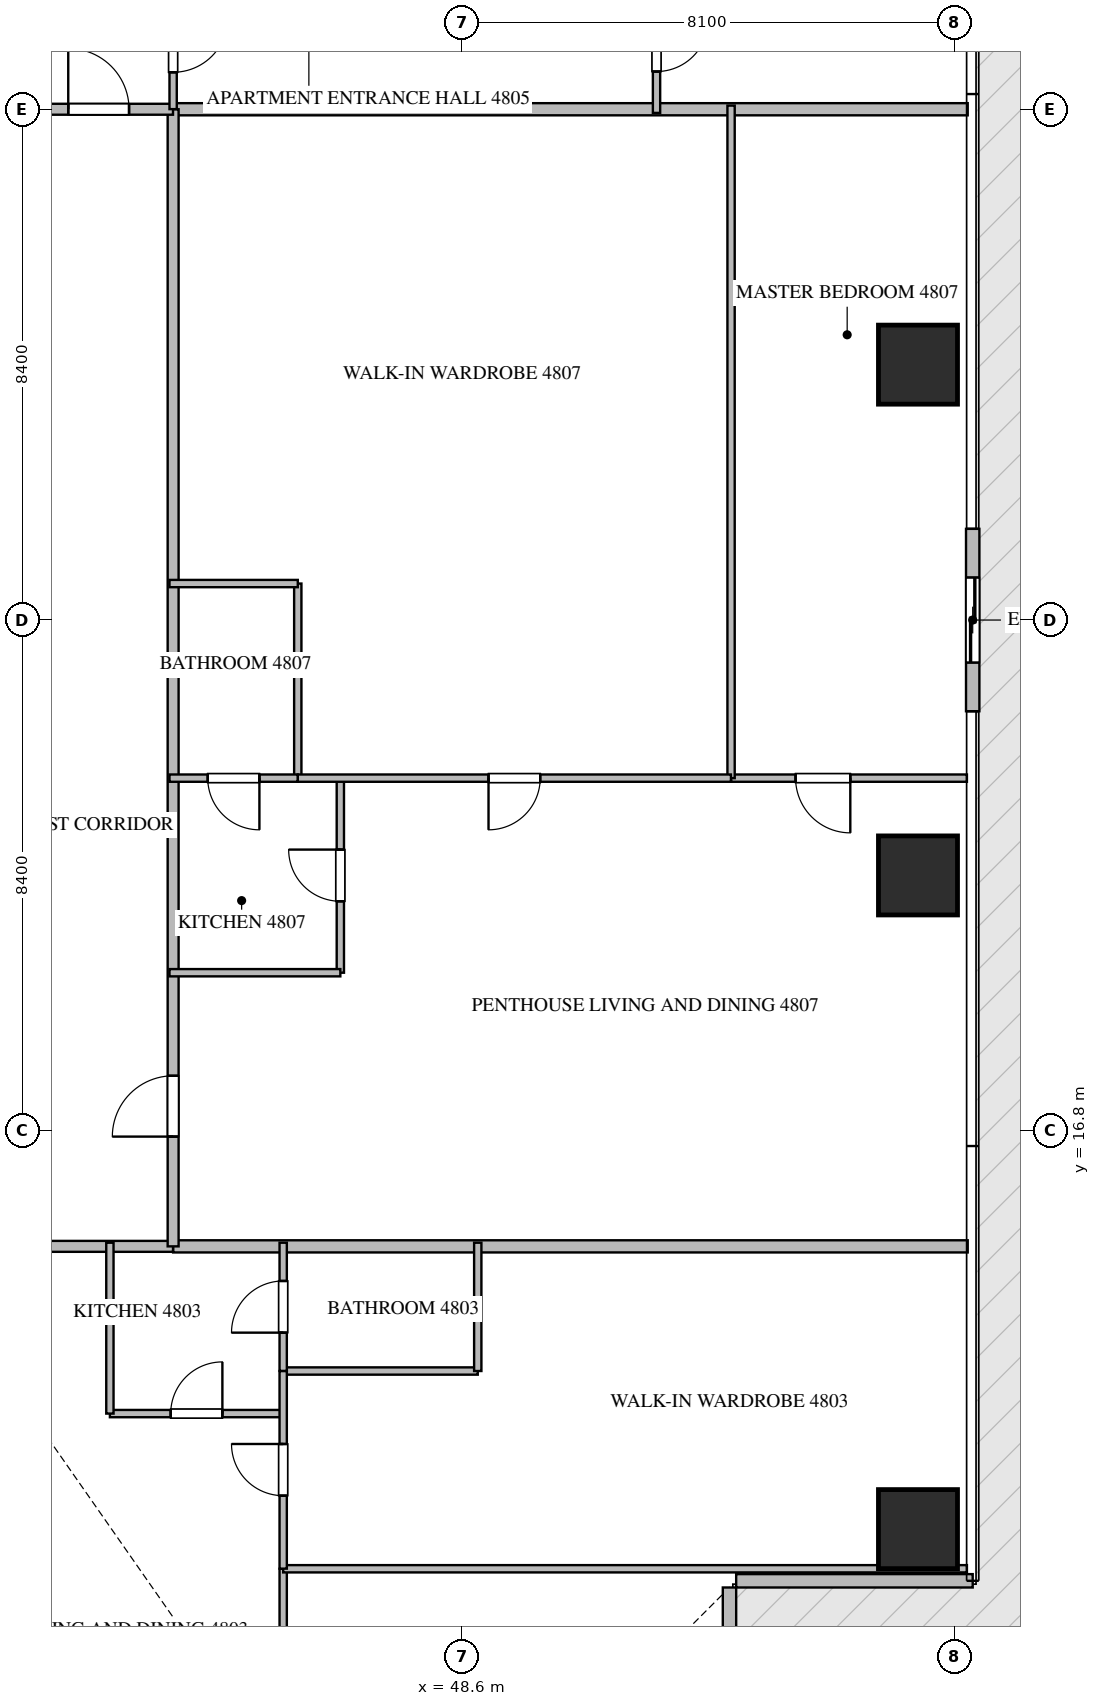
"""IFC4 building model, lengths in metres.
Left out: names, types, materials, properties, quantities, classifications, styles, units other than length and angle.
Written with IfcOpenShell. Run it as: python <this file> out.ifc"""

import sys

from ifc_helpers import new_model, si_unit, direction, frame, frame_2d, origin, origin_2d, place, context, subcontext, project, spatial, rectangle, extrude, source, transform, mapped, element, fill, save


model = new_model("IFC4")
c1 = context("Model", 3, precision=1e-05, world=origin(), true_north=direction((0.0, 1.0)))
c2 = subcontext(c1, "Body", "Model", "MODEL_VIEW")
j1 = project(units=[si_unit("LENGTHUNIT", "METRE"), si_unit("PLANEANGLEUNIT", "RADIAN")], contexts=[c1])
p1 = place(None, origin())
s1 = spatial("IfcSite", under=j1, at=p1, CompositionType="ELEMENT")
p2 = place(p1, origin())
s2 = spatial("IfcBuilding", under=s1, at=p2, CompositionType="ELEMENT")
p3 = place(p2, frame((0.0, 0.0, 191.4)))
s3 = spatial("IfcBuildingStorey", under=s2, at=p3, CompositionType="ELEMENT", Elevation=191.4)
m1 = source(origin(), c2, "Body", "SweptSolid", [
    extrude(rectangle(XDim=1.3, YDim=1.3, at=origin_2d()), origin(), (0.0, 0.0, 1.0), 3.75),
])
for number, where, z_axis, x_axis in (
    (1, (56.1, 10.25, -0.26), (0.0, 0.0, 1.0), (1.0, 0.0, 0.0)),
    (2, (56.1, 21.0, -0.26), (0.0, 0.0, 1.0), (1.0, 0.0, 0.0)),
    (3, (56.1, 29.4, -0.26), (0.0, 0.0, 1.0), (1.0, 0.0, 0.0)),
):
    element("IfcColumn", number, at=place(p3, frame(where, z_axis=z_axis, x_axis=x_axis)), inside=s3, PredefinedType="COLUMN", context=c2, shape_type="MappedRepresentation", body=[
        mapped(m1, transform((0.0, 0.0, 0.0), scale=1.0)),
    ])
p4 = place(p3, frame((53.0, 5.51, 0.0), z_axis=(0.0, 0.0, 1.0), x_axis=(0.0, 1.0, 0.0)))
e4 = element("IfcWall", 4, at=p4, inside=s3, PredefinedType="ELEMENTEDWALL", context=c2, shape_type="SweptSolid", body=[
    extrude(rectangle(XDim=3.78, YDim=0.22, at=frame_2d((1.89, 0.0))), origin(), (0.0, 0.0, 1.0), 3.475),
])
p5 = place(p4, frame((0.89, 0.0, 0.65)))
e5 = element("IfcOpeningElement", 5, at=p5, cuts=e4, PredefinedType="OPENING", context=c2, shape_type="SweptSolid", body=[
    extrude(rectangle(XDim=2.0, YDim=2.2, at=frame_2d((1.0, 1.1))), frame((0.0, 0.12, 0.0), z_axis=(0.0, -1.0, 0.0), x_axis=(1.0, 0.0, 0.0)), (0.0, 0.0, 1.0), 0.24),
])
p6 = place(p3, frame((53.11, 9.4, 0.0), z_axis=(0.0, 0.0, 1.0), x_axis=(1.0, 0.0, 0.0)))
e6 = element("IfcWall", 6, at=p6, inside=s3, PredefinedType="ELEMENTEDWALL", context=c2, shape_type="SweptSolid", body=[
    extrude(rectangle(XDim=3.89, YDim=0.22, at=frame_2d((1.945, 0.0))), origin(), (0.0, 0.0, 1.0), 3.475),
])
p7 = place(p3, frame((57.0, 23.7, 0.0), z_axis=(0.0, 0.0, 1.0), x_axis=(0.0, 1.0, 0.0)))
e7 = element("IfcWall", 7, at=p7, inside=s3, PredefinedType="ELEMENTEDWALL", context=c2, shape_type="SweptSolid", body=[
    extrude(rectangle(XDim=3.0, YDim=0.22, at=frame_2d((1.5, 0.0))), origin(), (0.0, 0.0, 1.0), 3.475),
])
p8 = place(p7, frame((0.8, 0.0, 0.0)))
e8 = element("IfcOpeningElement", 8, at=p8, cuts=e7, PredefinedType="OPENING", context=c2, shape_type="SweptSolid", body=[
    extrude(rectangle(XDim=1.4, YDim=2.25, at=frame_2d((0.7, 1.125))), frame((0.0, 0.12, 0.0), z_axis=(0.0, -1.0, 0.0), x_axis=(1.0, 0.0, 0.0)), (0.0, 0.0, 1.0), 0.24),
])
for number, where, z_axis, x_axis in (
    (9, (43.85, 14.9, 0.0), (0.0, 0.0, 1.0), (1.0, 0.0, 0.0)),
    (10, (43.85, 33.6, 0.0), (0.0, 0.0, 1.0), (1.0, 0.0, 0.0)),
):
    element("IfcWall", number, at=place(p3, frame(where, z_axis=z_axis, x_axis=x_axis)), inside=s3, PredefinedType="PARTITIONING", context=c2, shape_type="SweptSolid", body=[
        extrude(rectangle(XDim=13.068, YDim=0.2, at=frame_2d((6.534, 0.0))), origin(), (0.0, 0.0, 1.0), 3.49),
    ])
p9 = place(p3, frame((20.952, 14.9, 0.0), z_axis=(0.0, 0.0, 1.0), x_axis=(1.0, 0.0, 0.0)))
e11 = element("IfcWall", 11, at=p9, inside=s3, PredefinedType="PARTITIONING", context=c2, shape_type="SweptSolid", body=[
    extrude(rectangle(XDim=22.896, YDim=0.18, at=frame_2d((11.448, 0.0))), origin(), (0.0, 0.0, 1.0), 3.49),
])
p10 = place(p9, frame((2.387, 0.0, 0.0)))
e12 = element("IfcOpeningElement", 12, at=p10, cuts=e11, PredefinedType="OPENING", context=c2, shape_type="SweptSolid", body=[
    extrude(rectangle(XDim=1.0, YDim=2.15, at=frame_2d((0.5, 1.075))), frame((0.0, 0.1, 0.0), z_axis=(0.0, -1.0, 0.0), x_axis=(1.0, 0.0, 0.0)), (0.0, 0.0, 1.0), 0.2),
])
p11 = place(p9, frame((14.867, 0.0, 0.0)))
e13 = element("IfcOpeningElement", 13, at=p11, cuts=e11, PredefinedType="OPENING", context=c2, shape_type="SweptSolid", body=[
    extrude(rectangle(XDim=1.0, YDim=2.15, at=frame_2d((0.5, 1.075))), frame((0.0, 0.1, 0.0), z_axis=(0.0, -1.0, 0.0), x_axis=(1.0, 0.0, 0.0)), (0.0, 0.0, 1.0), 0.2),
])
p12 = place(p9, frame((19.356, 0.0, 0.0)))
e14 = element("IfcOpeningElement", 14, at=p12, cuts=e11, PredefinedType="OPENING", context=c2, shape_type="SweptSolid", body=[
    extrude(rectangle(XDim=1.0, YDim=2.15, at=frame_2d((0.5, 1.075))), frame((0.0, 0.1, 0.0), z_axis=(0.0, -1.0, 0.0), x_axis=(1.0, 0.0, 0.0)), (0.0, 0.0, 1.0), 0.2),
])
p13 = place(p3, frame((43.85, 14.9, 0.0), z_axis=(0.0, 0.0, 1.0), x_axis=(0.0, 1.0, 0.0)))
e15 = element("IfcWall", 15, at=p13, inside=s3, PredefinedType="PARTITIONING", context=c2, shape_type="SweptSolid", body=[
    extrude(rectangle(XDim=18.7, YDim=0.18, at=frame_2d((9.35, 0.0))), origin(), (0.0, 0.0, 1.0), 3.49),
])
p14 = place(p13, frame((1.805, 0.0, 0.0)))
e16 = element("IfcOpeningElement", 16, at=p14, cuts=e15, PredefinedType="OPENING", context=c2, shape_type="SweptSolid", body=[
    extrude(rectangle(XDim=1.0, YDim=2.15, at=frame_2d((0.5, 1.075))), frame((0.0, 0.1, 0.0), z_axis=(0.0, -1.0, 0.0), x_axis=(1.0, 0.0, 0.0)), (0.0, 0.0, 1.0), 0.2),
])
p15 = place(p3, frame((41.402, 33.6, 0.0), z_axis=(0.0, 0.0, 1.0), x_axis=(1.0, 0.0, 0.0)))
e17 = element("IfcWall", 17, at=p15, inside=s3, PredefinedType="PARTITIONING", context=c2, shape_type="SweptSolid", body=[
    extrude(rectangle(XDim=2.446, YDim=0.18, at=frame_2d((1.223, 0.0))), origin(), (0.0, 0.0, 1.0), 3.49),
])
p16 = place(p15, frame((0.723, 0.0, 0.0)))
e18 = element("IfcOpeningElement", 18, at=p16, cuts=e17, PredefinedType="OPENING", context=c2, shape_type="SweptSolid", body=[
    extrude(rectangle(XDim=1.0, YDim=2.15, at=frame_2d((0.5, 1.075))), frame((0.0, 0.1, 0.0), z_axis=(0.0, -1.0, 0.0), x_axis=(1.0, 0.0, 0.0)), (0.0, 0.0, 1.0), 0.2),
])
p17 = place(p3, frame((42.81, 12.15, 0.0), z_axis=(0.0, 0.0, 1.0), x_axis=(1.0, 0.0, 0.0)))
e19 = element("IfcWall", 19, at=p17, inside=s3, PredefinedType="PARTITIONING", context=c2, shape_type="SweptSolid", body=[
    extrude(rectangle(XDim=2.85, YDim=0.12, at=frame_2d((1.425, 0.0))), origin(), (0.0, 0.0, 1.0), 3.49),
])
p18 = place(p17, frame((1.0, 0.0, 0.0)))
e20 = element("IfcOpeningElement", 20, at=p18, cuts=e19, PredefinedType="OPENING", context=c2, shape_type="SweptSolid", body=[
    extrude(rectangle(XDim=0.85, YDim=2.1, at=frame_2d((0.425, 1.05))), frame((0.0, 0.07, 0.0), z_axis=(0.0, -1.0, 0.0), x_axis=(1.0, 0.0, 0.0)), (0.0, 0.0, 1.0), 0.14),
])
p19 = place(p3, frame((42.81, 12.15, 0.0), z_axis=(0.0, 0.0, 1.0), x_axis=(0.0, 1.0, 0.0)))
e21 = element("IfcWall", 21, at=p19, inside=s3, PredefinedType="PARTITIONING", context=c2, shape_type="SweptSolid", body=[
    extrude(rectangle(XDim=2.81, YDim=0.12, at=frame_2d((1.405, 0.0))), origin(), (0.0, 0.0, 1.0), 3.49),
])
p20 = place(p3, frame((45.66, 1.495, 0.0), z_axis=(0.0, 0.0, 1.0), x_axis=(0.0, 1.0, 0.0)))
e22 = element("IfcWall", 22, at=p20, inside=s3, PredefinedType="PARTITIONING", context=c2, shape_type="SweptSolid", body=[
    extrude(rectangle(XDim=8.103, YDim=0.12, at=frame_2d((4.051, 0.0))), origin(), (0.0, 0.0, 1.0), 3.49),
])
p21 = place(p20, frame((3.962, 0.0, 0.0)))
e23 = element("IfcOpeningElement", 23, at=p21, cuts=e22, PredefinedType="OPENING", context=c2, shape_type="SweptSolid", body=[
    extrude(rectangle(XDim=0.9, YDim=2.1, at=frame_2d((0.45, 1.05))), frame((0.0, 0.07, 0.0), z_axis=(0.0, -1.0, 0.0), x_axis=(1.0, 0.0, 0.0)), (0.0, 0.0, 1.0), 0.14),
])
p22 = place(p3, frame((45.66, 9.598, 0.0), z_axis=(0.0, 0.0, 1.0), x_axis=(1.0, 0.0, 0.0)))
e24 = element("IfcWall", 24, at=p22, inside=s3, PredefinedType="PARTITIONING", context=c2, shape_type="SweptSolid", body=[
    extrude(rectangle(XDim=11.245, YDim=0.12, at=frame_2d((5.623, 0.0))), origin(), (0.0, 0.0, 1.0), 3.49),
])
p23 = place(p3, frame((45.66, 12.85, 0.0), z_axis=(0.0, 0.0, 1.0), x_axis=(1.0, 0.0, 0.0)))
e25 = element("IfcWall", 25, at=p23, inside=s3, PredefinedType="PARTITIONING", context=c2, shape_type="SweptSolid", body=[
    extrude(rectangle(XDim=3.2, YDim=0.12, at=frame_2d((1.6, 0.0))), origin(), (0.0, 0.0, 1.0), 3.49),
])
p24 = place(p3, frame((48.86, 12.85, 0.0), z_axis=(0.0, 0.0, 1.0), x_axis=(0.0, 1.0, 0.0)))
e26 = element("IfcWall", 26, at=p24, inside=s3, PredefinedType="PARTITIONING", context=c2, shape_type="SweptSolid", body=[
    extrude(rectangle(XDim=2.11, YDim=0.12, at=frame_2d((1.055, 0.0))), origin(), (0.0, 0.0, 1.0), 3.49),
])
p25 = place(p3, frame((45.66, 9.6, 0.0), z_axis=(0.0, 0.0, 1.0), x_axis=(0.0, 1.0, 0.0)))
e27 = element("IfcWall", 27, at=p25, inside=s3, PredefinedType="PARTITIONING", context=c2, shape_type="SweptSolid", body=[
    extrude(rectangle(XDim=3.25, YDim=0.12, at=frame_2d((1.625, 0.0))), origin(), (0.0, 0.0, 1.0), 3.49),
])
p26 = place(p25, frame((1.2, 0.0, 0.0)))
e28 = element("IfcOpeningElement", 28, at=p26, cuts=e27, PredefinedType="OPENING", context=c2, shape_type="SweptSolid", body=[
    extrude(rectangle(XDim=0.85, YDim=2.1, at=frame_2d((0.425, 1.05))), frame((0.0, 0.07, 0.0), z_axis=(0.0, -1.0, 0.0), x_axis=(1.0, 0.0, 0.0)), (0.0, 0.0, 1.0), 0.14),
])
p27 = place(p3, frame((45.66, 12.852, 0.0), z_axis=(0.0, 0.0, 1.0), x_axis=(0.0, 1.0, 0.0)))
e29 = element("IfcWall", 29, at=p27, inside=s3, PredefinedType="PARTITIONING", context=c2, shape_type="SweptSolid", body=[
    extrude(rectangle(XDim=2.108, YDim=0.12, at=frame_2d((1.054, 0.0))), origin(), (0.0, 0.0, 1.0), 3.49),
])
p28 = place(p27, frame((0.629, 0.0, 0.0)))
e30 = element("IfcOpeningElement", 30, at=p28, cuts=e29, PredefinedType="OPENING", context=c2, shape_type="SweptSolid", body=[
    extrude(rectangle(XDim=0.85, YDim=2.1, at=frame_2d((0.425, 1.05))), frame((0.0, 0.07, 0.0), z_axis=(0.0, -1.0, 0.0), x_axis=(1.0, 0.0, 0.0)), (0.0, 0.0, 1.0), 0.14),
])
p29 = place(p3, frame((43.85, 35.75, 0.0), z_axis=(0.0, 0.0, 1.0), x_axis=(0.0, -1.0, 0.0)))
e31 = element("IfcWall", 31, at=p29, inside=s3, PredefinedType="PARTITIONING", context=c2, shape_type="SweptSolid", body=[
    extrude(rectangle(XDim=2.148, YDim=0.12, at=frame_2d((1.074, 0.0))), origin(), (0.0, 0.0, 1.0), 3.49),
])
p30 = place(p29, frame((0.642, 0.0, 0.0)))
e32 = element("IfcOpeningElement", 32, at=p30, cuts=e31, PredefinedType="OPENING", context=c2, shape_type="SweptSolid", body=[
    extrude(rectangle(XDim=0.9, YDim=2.1, at=frame_2d((0.45, 1.05))), frame((0.0, 0.07, 0.0), z_axis=(0.0, -1.0, 0.0), x_axis=(1.0, 0.0, 0.0)), (0.0, 0.0, 1.0), 0.14),
])
p31 = place(p3, frame((51.8, 35.75, 0.0), z_axis=(0.0, 0.0, 1.0), x_axis=(0.0, -1.0, 0.0)))
e33 = element("IfcWall", 33, at=p31, inside=s3, PredefinedType="PARTITIONING", context=c2, shape_type="SweptSolid", body=[
    extrude(rectangle(XDim=2.21, YDim=0.12, at=frame_2d((1.105, 0.0))), origin(), (0.0, 0.0, 1.0), 3.49),
])
p32 = place(p31, frame((0.68, 0.0, 0.0)))
e34 = element("IfcOpeningElement", 34, at=p32, cuts=e33, PredefinedType="OPENING", context=c2, shape_type="SweptSolid", body=[
    extrude(rectangle(XDim=0.85, YDim=2.1, at=frame_2d((0.425, 1.05))), frame((0.0, 0.07, 0.0), z_axis=(0.0, -1.0, 0.0), x_axis=(1.0, 0.0, 0.0)), (0.0, 0.0, 1.0), 0.14),
])
p33 = place(p3, frame((46.6, 19.4, 0.0), z_axis=(0.0, 0.0, 1.0), x_axis=(0.0, 1.0, 0.0)))
e35 = element("IfcWall", 35, at=p33, inside=s3, PredefinedType="PARTITIONING", context=c2, shape_type="SweptSolid", body=[
    extrude(rectangle(XDim=3.2, YDim=0.12, at=frame_2d((1.6, 0.0))), origin(), (0.0, 0.0, 1.0), 3.49),
])
p34 = place(p33, frame((1.175, 0.0, 0.0)))
e36 = element("IfcOpeningElement", 36, at=p34, cuts=e35, PredefinedType="OPENING", context=c2, shape_type="SweptSolid", body=[
    extrude(rectangle(XDim=0.85, YDim=2.1, at=frame_2d((0.425, 1.05))), frame((0.0, 0.07, 0.0), z_axis=(0.0, -1.0, 0.0), x_axis=(1.0, 0.0, 0.0)), (0.0, 0.0, 1.0), 0.14),
])
p35 = place(p3, frame((46.6, 19.4, 0.0), z_axis=(0.0, 0.0, 1.0), x_axis=(-1.0, 0.0, 0.0)))
e37 = element("IfcWall", 37, at=p35, inside=s3, PredefinedType="PARTITIONING", context=c2, shape_type="SweptSolid", body=[
    extrude(rectangle(XDim=2.81, YDim=0.12, at=frame_2d((1.405, 0.0))), origin(), (0.0, 0.0, 1.0), 3.49),
])
p36 = place(p3, frame((56.905, 22.6, 0.0), z_axis=(0.0, 0.0, 1.0), x_axis=(-1.0, 0.0, 0.0)))
e38 = element("IfcWall", 38, at=p36, inside=s3, PredefinedType="PARTITIONING", context=c2, shape_type="SweptSolid", body=[
    extrude(rectangle(XDim=3.879, YDim=0.12, at=frame_2d((1.939, 0.0))), origin(), (0.0, 0.0, 1.0), 3.49),
])
p37 = place(p36, frame((1.918, 0.0, 0.0)))
e39 = element("IfcOpeningElement", 39, at=p37, cuts=e38, PredefinedType="OPENING", context=c2, shape_type="SweptSolid", body=[
    extrude(rectangle(XDim=0.9, YDim=2.1, at=frame_2d((0.45, 1.05))), frame((0.0, 0.07, 0.0), z_axis=(0.0, -1.0, 0.0), x_axis=(1.0, 0.0, 0.0)), (0.0, 0.0, 1.0), 0.14),
])
p38 = place(p3, frame((53.026, 22.6, 0.0), z_axis=(0.0, 0.0, 1.0), x_axis=(0.0, 1.0, 0.0)))
e40 = element("IfcWall", 40, at=p38, inside=s3, PredefinedType="PARTITIONING", context=c2, shape_type="SweptSolid", body=[
    extrude(rectangle(XDim=11.06, YDim=0.12, at=frame_2d((5.53, 0.0))), origin(), (0.0, 0.0, 1.0), 3.49),
])
p39 = place(p3, frame((45.9, 22.6, 0.0), z_axis=(0.0, 0.0, 1.0), x_axis=(0.0, 1.0, 0.0)))
e41 = element("IfcWall", 41, at=p39, inside=s3, PredefinedType="PARTITIONING", context=c2, shape_type="SweptSolid", body=[
    extrude(rectangle(XDim=3.2, YDim=0.12, at=frame_2d((1.6, 0.0))), origin(), (0.0, 0.0, 1.0), 3.49),
])
p40 = place(p3, frame((45.9, 25.8, 0.0), z_axis=(0.0, 0.0, 1.0), x_axis=(-1.0, 0.0, 0.0)))
e42 = element("IfcWall", 42, at=p40, inside=s3, PredefinedType="PARTITIONING", context=c2, shape_type="SweptSolid", body=[
    extrude(rectangle(XDim=2.11, YDim=0.12, at=frame_2d((1.055, 0.0))), origin(), (0.0, 0.0, 1.0), 3.49),
])
p41 = place(p3, frame((53.024, 22.6, 0.0), z_axis=(0.0, 0.0, 1.0), x_axis=(-1.0, 0.0, 0.0)))
e43 = element("IfcWall", 43, at=p41, inside=s3, PredefinedType="PARTITIONING", context=c2, shape_type="SweptSolid", body=[
    extrude(rectangle(XDim=7.124, YDim=0.12, at=frame_2d((3.562, 0.0))), origin(), (0.0, 0.0, 1.0), 3.49),
])
p42 = place(p41, frame((3.137, 0.0, 0.0)))
e44 = element("IfcOpeningElement", 44, at=p42, cuts=e43, PredefinedType="OPENING", context=c2, shape_type="SweptSolid", body=[
    extrude(rectangle(XDim=0.85, YDim=2.1, at=frame_2d((0.425, 1.05))), frame((0.0, 0.07, 0.0), z_axis=(0.0, -1.0, 0.0), x_axis=(1.0, 0.0, 0.0)), (0.0, 0.0, 1.0), 0.14),
])
p43 = place(p3, frame((45.898, 22.6, 0.0), z_axis=(0.0, 0.0, 1.0), x_axis=(-1.0, 0.0, 0.0)))
e45 = element("IfcWall", 45, at=p43, inside=s3, PredefinedType="PARTITIONING", context=c2, shape_type="SweptSolid", body=[
    extrude(rectangle(XDim=2.108, YDim=0.12, at=frame_2d((1.054, 0.0))), origin(), (0.0, 0.0, 1.0), 3.49),
])
p44 = place(p43, frame((0.629, 0.0, 0.0)))
e46 = element("IfcOpeningElement", 46, at=p44, cuts=e45, PredefinedType="OPENING", context=c2, shape_type="SweptSolid", body=[
    extrude(rectangle(XDim=0.85, YDim=2.1, at=frame_2d((0.425, 1.05))), frame((0.0, 0.07, 0.0), z_axis=(0.0, -1.0, 0.0), x_axis=(1.0, 0.0, 0.0)), (0.0, 0.0, 1.0), 0.14),
])
m2 = source(origin(), c2, "Body", "SweptSolid", [
    extrude(rectangle(XDim=1.4, YDim=2.25, at=frame_2d((0.7, 1.125))), frame((0.0, 0.025, 0.0), z_axis=(0.0, -1.0, 0.0), x_axis=(1.0, 0.0, 0.0)), (0.0, 0.0, 1.0), 0.05),
])
p45 = place(p8, origin())
e47 = element("IfcDoor", 47, at=p45, inside=s3, OperationType="SLIDING_TO_LEFT", PredefinedType="DOOR", context=c2, shape_type="MappedRepresentation", body=[
    mapped(m2, transform((0.0, 0.0, 0.0), scale=1.0)),
])
fill(e8, e47)
m3 = source(origin(), c2, "Body", "SweptSolid", [
    extrude(rectangle(XDim=1.0, YDim=2.15, at=frame_2d((0.5, 1.075))), frame((0.0, 0.025, 0.0), z_axis=(0.0, -1.0, 0.0), x_axis=(1.0, 0.0, 0.0)), (0.0, 0.0, 1.0), 0.05),
])
p46 = place(p14, origin())
e48 = element("IfcDoor", 48, at=p46, inside=s3, OperationType="SINGLE_SWING_LEFT", PredefinedType="DOOR", context=c2, shape_type="MappedRepresentation", body=[
    mapped(m3, transform((0.0, 0.0, 0.0), scale=1.0)),
])
fill(e16, e48)
p47 = place(p16, origin())
e49 = element("IfcDoor", 49, at=p47, inside=s3, OperationType="SINGLE_SWING_LEFT", PredefinedType="DOOR", context=c2, shape_type="MappedRepresentation", body=[
    mapped(m3, transform((0.0, 0.0, 0.0), scale=1.0)),
])
fill(e18, e49)
m4 = source(origin(), c2, "Body", "SweptSolid", [
    extrude(rectangle(XDim=0.85, YDim=2.1, at=frame_2d((0.425, 1.05))), frame((0.0, 0.025, 0.0), z_axis=(0.0, -1.0, 0.0), x_axis=(1.0, 0.0, 0.0)), (0.0, 0.0, 1.0), 0.05),
])
p48 = place(p18, origin())
e50 = element("IfcDoor", 50, at=p48, inside=s3, OperationType="SINGLE_SWING_RIGHT", PredefinedType="DOOR", context=c2, shape_type="MappedRepresentation", body=[
    mapped(m4, transform((0.0, 0.0, 0.0), scale=1.0)),
])
fill(e20, e50)
p49 = place(p26, origin())
e51 = element("IfcDoor", 51, at=p49, inside=s3, OperationType="SINGLE_SWING_RIGHT", PredefinedType="DOOR", context=c2, shape_type="MappedRepresentation", body=[
    mapped(m4, transform((0.0, 0.0, 0.0), scale=1.0)),
])
fill(e28, e51)
p50 = place(p28, origin())
e52 = element("IfcDoor", 52, at=p50, inside=s3, OperationType="SINGLE_SWING_LEFT", PredefinedType="DOOR", context=c2, shape_type="MappedRepresentation", body=[
    mapped(m4, transform((0.0, 0.0, 0.0), scale=1.0)),
])
fill(e30, e52)
m5 = source(origin(), c2, "Body", "SweptSolid", [
    extrude(rectangle(XDim=0.9, YDim=2.1, at=frame_2d((0.45, 1.05))), frame((0.0, 0.025, 0.0), z_axis=(0.0, -1.0, 0.0), x_axis=(1.0, 0.0, 0.0)), (0.0, 0.0, 1.0), 0.05),
])
p51 = place(p30, origin())
e53 = element("IfcDoor", 53, at=p51, inside=s3, OperationType="SINGLE_SWING_LEFT", PredefinedType="DOOR", context=c2, shape_type="MappedRepresentation", body=[
    mapped(m5, transform((0.0, 0.0, 0.0), scale=1.0)),
])
fill(e32, e53)
p52 = place(p32, origin())
e54 = element("IfcDoor", 54, at=p52, inside=s3, OperationType="SINGLE_SWING_LEFT", PredefinedType="DOOR", context=c2, shape_type="MappedRepresentation", body=[
    mapped(m4, transform((0.0, 0.0, 0.0), scale=1.0)),
])
fill(e34, e54)
p53 = place(p34, origin())
e55 = element("IfcDoor", 55, at=p53, inside=s3, OperationType="SINGLE_SWING_RIGHT", PredefinedType="DOOR", context=c2, shape_type="MappedRepresentation", body=[
    mapped(m4, transform((0.0, 0.0, 0.0), scale=1.0)),
])
fill(e36, e55)
p54 = place(p37, origin())
e56 = element("IfcDoor", 56, at=p54, inside=s3, OperationType="SINGLE_SWING_LEFT", PredefinedType="DOOR", context=c2, shape_type="MappedRepresentation", body=[
    mapped(m5, transform((0.0, 0.0, 0.0), scale=1.0)),
])
fill(e39, e56)
p55 = place(p42, origin())
e57 = element("IfcDoor", 57, at=p55, inside=s3, OperationType="SINGLE_SWING_RIGHT", PredefinedType="DOOR", context=c2, shape_type="MappedRepresentation", body=[
    mapped(m4, transform((0.0, 0.0, 0.0), scale=1.0)),
])
fill(e44, e57)
p56 = place(p44, origin())
e58 = element("IfcDoor", 58, at=p56, inside=s3, OperationType="SINGLE_SWING_LEFT", PredefinedType="DOOR", context=c2, shape_type="MappedRepresentation", body=[
    mapped(m4, transform((0.0, 0.0, 0.0), scale=1.0)),
])
fill(e46, e58)
save(model, sys.argv[1])
